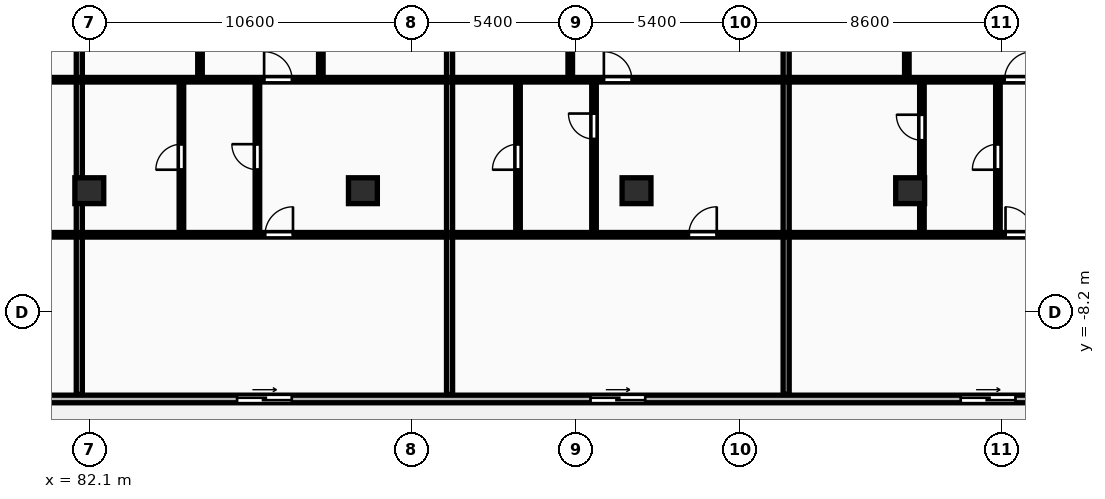
"""IFC4 building model, lengths in metres.
Left out: names, types, materials, properties, quantities, classifications, styles, units other than length and angle.
Written with IfcOpenShell. Run it as: python <this file> out.ifc"""

import sys

from ifc_helpers import new_model, si_unit, direction, frame, frame_2d, origin, origin_2d, place, context, subcontext, project, spatial, rectangle, extrude, element, fill, save


model = new_model("IFC4")
c1 = context("Model", 3, precision=1e-05, world=origin(), true_north=direction((0.0, 1.0)))
c2 = subcontext(c1, "Body", "Model", "MODEL_VIEW")
j1 = project(units=[si_unit("LENGTHUNIT", "METRE"), si_unit("PLANEANGLEUNIT", "RADIAN")], contexts=[c1])
p1 = place(None, origin())
s1 = spatial("IfcSite", under=j1, at=p1, CompositionType="ELEMENT")
p2 = place(p1, origin())
s2 = spatial("IfcBuilding", under=s1, at=p2, CompositionType="ELEMENT")
p3 = place(p2, frame((0.0, 0.0, 24.0)))
s3 = spatial("IfcBuildingStorey", under=s2, at=p3, CompositionType="ELEMENT", Elevation=24.0)
for number, where, z_axis, x_axis in (
    (1, (82.1, -4.2, 0.0), (0.0, 0.0, 1.0), (1.0, 0.0, 0.0)),
    (2, (91.1, -4.2, 0.0), (0.0, 0.0, 1.0), (1.0, 0.0, 0.0)),
    (3, (100.1, -4.2, 0.0), (0.0, 0.0, 1.0), (1.0, 0.0, 0.0)),
    (4, (109.1, -4.2, 0.0), (0.0, 0.0, 1.0), (1.0, 0.0, 0.0)),
):
    element("IfcColumn", number, at=place(p3, frame(where, z_axis=z_axis, x_axis=x_axis)), inside=s3, PredefinedType="COLUMN", context=c2, shape_type="SweptSolid", body=[
        extrude(rectangle(XDim=0.95, YDim=0.85, at=origin_2d()), origin(), (0.0, 0.0, 1.0), 3.25),
    ])
p4 = place(p3, frame((70.7, -11.05, 0.0), z_axis=(0.0, 0.0, 1.0), x_axis=(1.0, 0.0, 0.0)))
e5 = element("IfcWall", 5, at=p4, inside=s3, PredefinedType="STANDARD", context=c2, shape_type="SweptSolid", body=[
    extrude(rectangle(XDim=62.0, YDim=0.25, at=frame_2d((31.0, 0.0))), origin(), (0.0, 0.0, 1.0), 2.97),
])
p5 = place(p4, frame((4.636, 0.0, 0.0)))
e6 = element("IfcOpeningElement", 6, at=p5, cuts=e5, PredefinedType="OPENING", context=c2, shape_type="SweptSolid", body=[
    extrude(rectangle(XDim=1.8, YDim=2.2, at=frame_2d((0.9, 1.1))), frame((0.0, 0.135, 0.0), z_axis=(0.0, -1.0, 0.0), x_axis=(1.0, 0.0, 0.0)), (0.0, 0.0, 1.0), 0.27),
])
p6 = place(p4, frame((16.261, 0.0, 0.0)))
e7 = element("IfcOpeningElement", 7, at=p6, cuts=e5, PredefinedType="OPENING", context=c2, shape_type="SweptSolid", body=[
    extrude(rectangle(XDim=1.8, YDim=2.2, at=frame_2d((0.9, 1.1))), frame((0.0, 0.135, 0.0), z_axis=(0.0, -1.0, 0.0), x_axis=(1.0, 0.0, 0.0)), (0.0, 0.0, 1.0), 0.27),
])
p7 = place(p4, frame((27.886, 0.0, 0.0)))
e8 = element("IfcOpeningElement", 8, at=p7, cuts=e5, PredefinedType="OPENING", context=c2, shape_type="SweptSolid", body=[
    extrude(rectangle(XDim=1.8, YDim=2.2, at=frame_2d((0.9, 1.1))), frame((0.0, 0.135, 0.0), z_axis=(0.0, -1.0, 0.0), x_axis=(1.0, 0.0, 0.0)), (0.0, 0.0, 1.0), 0.27),
])
p8 = place(p4, frame((40.064, 0.0, 0.0)))
e9 = element("IfcOpeningElement", 9, at=p8, cuts=e5, PredefinedType="OPENING", context=c2, shape_type="SweptSolid", body=[
    extrude(rectangle(XDim=1.8, YDim=2.2, at=frame_2d((0.9, 1.1))), frame((0.0, 0.135, 0.0), z_axis=(0.0, -1.0, 0.0), x_axis=(1.0, 0.0, 0.0)), (0.0, 0.0, 1.0), 0.27),
])
p9 = place(p4, frame((51.124, 0.0, 0.0)))
e10 = element("IfcOpeningElement", 10, at=p9, cuts=e5, PredefinedType="OPENING", context=c2, shape_type="SweptSolid", body=[
    extrude(rectangle(XDim=1.8, YDim=2.2, at=frame_2d((0.9, 1.1))), frame((0.0, 0.135, 0.0), z_axis=(0.0, -1.0, 0.0), x_axis=(1.0, 0.0, 0.0)), (0.0, 0.0, 1.0), 0.27),
])
p10 = place(p4, frame((57.9, 0.0, 0.85)))
e11 = element("IfcOpeningElement", 11, at=p10, cuts=e5, PredefinedType="OPENING", context=c2, shape_type="SweptSolid", body=[
    extrude(rectangle(XDim=2.4, YDim=1.9, at=frame_2d((1.2, 0.95))), frame((0.0, 0.135, 0.0), z_axis=(0.0, -1.0, 0.0), x_axis=(1.0, 0.0, 0.0)), (0.0, 0.0, 1.0), 0.27),
])
p11 = place(p3, frame((81.771, -10.9, 0.0), z_axis=(0.0, 0.0, 1.0), x_axis=(0.0, 1.0, 0.0)))
e12 = element("IfcWall", 12, at=p11, inside=s3, PredefinedType="PARTITIONING", context=c2, shape_type="SweptSolid", body=[
    extrude(rectangle(XDim=27.07, YDim=0.2, at=frame_2d((13.535, 0.0))), origin(), (0.0, 0.0, 1.0), 2.22),
])
p12 = place(p3, frame((70.78, -0.55, 0.0), z_axis=(0.0, 0.0, 1.0), x_axis=(1.0, 0.0, 0.0)))
e13 = element("IfcWall", 13, at=p12, inside=s3, PredefinedType="PARTITIONING", context=c2, shape_type="SweptSolid", body=[
    extrude(rectangle(XDim=10.911, YDim=0.15, at=frame_2d((5.456, 0.0))), origin(), (0.0, 0.0, 1.0), 2.97),
])
p13 = place(p12, frame((4.996, 0.0, 0.0)))
e14 = element("IfcOpeningElement", 14, at=p13, cuts=e13, PredefinedType="OPENING", context=c2, shape_type="SweptSolid", body=[
    extrude(rectangle(XDim=0.92, YDim=2.08, at=frame_2d((0.46, 1.04))), frame((0.0, 0.085, 0.0), z_axis=(0.0, -1.0, 0.0), x_axis=(1.0, 0.0, 0.0)), (0.0, 0.0, 1.0), 0.17),
])
p14 = place(p3, frame((70.78, -5.65, 0.0), z_axis=(0.0, 0.0, 1.0), x_axis=(1.0, 0.0, 0.0)))
e15 = element("IfcWall", 15, at=p14, inside=s3, PredefinedType="PARTITIONING", context=c2, shape_type="SweptSolid", body=[
    extrude(rectangle(XDim=10.911, YDim=0.15, at=frame_2d((5.456, 0.0))), origin(), (0.0, 0.0, 1.0), 2.97),
])
p15 = place(p14, frame((5.399, 0.0, 0.0)))
e16 = element("IfcOpeningElement", 16, at=p15, cuts=e15, PredefinedType="OPENING", context=c2, shape_type="SweptSolid", body=[
    extrude(rectangle(XDim=0.92, YDim=2.08, at=frame_2d((0.46, 1.04))), frame((0.0, 0.085, 0.0), z_axis=(0.0, -1.0, 0.0), x_axis=(1.0, 0.0, 0.0)), (0.0, 0.0, 1.0), 0.17),
])
p16 = place(p3, frame((93.95, -10.9, 0.0), z_axis=(0.0, 0.0, 1.0), x_axis=(0.0, 1.0, 0.0)))
e17 = element("IfcWall", 17, at=p16, inside=s3, PredefinedType="PARTITIONING", context=c2, shape_type="SweptSolid", body=[
    extrude(rectangle(XDim=27.07, YDim=0.2, at=frame_2d((13.535, 0.0))), origin(), (0.0, 0.0, 1.0), 2.97),
])
p17 = place(p3, frame((89.716, -0.51, 0.0), z_axis=(0.0, 0.0, 1.0), x_axis=(0.0, 1.0, 0.0)))
e18 = element("IfcWall", 18, at=p17, inside=s3, PredefinedType="PARTITIONING", context=c2, shape_type="SweptSolid", body=[
    extrude(rectangle(XDim=8.53, YDim=0.15, at=frame_2d((4.265, 0.0))), origin(), (0.0, 0.0, 1.0), 2.97),
])
p18 = place(p17, frame((3.845, 0.0, 0.0)))
e19 = element("IfcOpeningElement", 19, at=p18, cuts=e18, PredefinedType="OPENING", context=c2, shape_type="SweptSolid", body=[
    extrude(rectangle(XDim=0.84, YDim=2.04, at=frame_2d((0.42, 1.02))), frame((0.0, 0.085, 0.0), z_axis=(0.0, -1.0, 0.0), x_axis=(1.0, 0.0, 0.0)), (0.0, 0.0, 1.0), 0.17),
])
p19 = place(p3, frame((85.741, -0.51, 0.0), z_axis=(0.0, 0.0, 1.0), x_axis=(0.0, 1.0, 0.0)))
e20 = element("IfcWall", 20, at=p19, inside=s3, PredefinedType="PARTITIONING", context=c2, shape_type="SweptSolid", body=[
    extrude(rectangle(XDim=16.7, YDim=0.15, at=frame_2d((8.35, 0.0))), origin(), (0.0, 0.0, 1.0), 2.97),
])
p20 = place(p19, frame((7.4, 0.0, 0.0)))
e21 = element("IfcOpeningElement", 21, at=p20, cuts=e20, PredefinedType="OPENING", context=c2, shape_type="SweptSolid", body=[
    extrude(rectangle(XDim=0.88, YDim=2.06, at=frame_2d((0.44, 1.03))), frame((0.0, 0.085, 0.0), z_axis=(0.0, -1.0, 0.0), x_axis=(1.0, 0.0, 0.0)), (0.0, 0.0, 1.0), 0.17),
])
p21 = place(p3, frame((85.13, -5.59, 0.0), z_axis=(0.0, 0.0, 1.0), x_axis=(0.0, 1.0, 0.0)))
e22 = element("IfcWall", 22, at=p21, inside=s3, PredefinedType="PARTITIONING", context=c2, shape_type="SweptSolid", body=[
    extrude(rectangle(XDim=5.0, YDim=0.15, at=frame_2d((2.5, 0.0))), origin(), (0.0, 0.0, 1.0), 2.97),
])
p22 = place(p21, frame((2.08, 0.0, 0.0)))
e23 = element("IfcOpeningElement", 23, at=p22, cuts=e22, PredefinedType="OPENING", context=c2, shape_type="SweptSolid", body=[
    extrude(rectangle(XDim=0.84, YDim=2.04, at=frame_2d((0.42, 1.02))), frame((0.0, 0.085, 0.0), z_axis=(0.0, -1.0, 0.0), x_axis=(1.0, 0.0, 0.0)), (0.0, 0.0, 1.0), 0.17),
])
p23 = place(p3, frame((87.63, -5.59, 0.0), z_axis=(0.0, 0.0, 1.0), x_axis=(0.0, 1.0, 0.0)))
e24 = element("IfcWall", 24, at=p23, inside=s3, PredefinedType="PARTITIONING", context=c2, shape_type="SweptSolid", body=[
    extrude(rectangle(XDim=5.0, YDim=0.15, at=frame_2d((2.5, 0.0))), origin(), (0.0, 0.0, 1.0), 2.97),
])
p24 = place(p23, frame((2.08, 0.0, 0.0)))
e25 = element("IfcOpeningElement", 25, at=p24, cuts=e24, PredefinedType="OPENING", context=c2, shape_type="SweptSolid", body=[
    extrude(rectangle(XDim=0.84, YDim=2.04, at=frame_2d((0.42, 1.02))), frame((0.0, 0.085, 0.0), z_axis=(0.0, -1.0, 0.0), x_axis=(1.0, 0.0, 0.0)), (0.0, 0.0, 1.0), 0.17),
])
p25 = place(p3, frame((81.851, -0.55, 0.0), z_axis=(0.0, 0.0, 1.0), x_axis=(1.0, 0.0, 0.0)))
e26 = element("IfcWall", 26, at=p25, inside=s3, PredefinedType="PARTITIONING", context=c2, shape_type="SweptSolid", body=[
    extrude(rectangle(XDim=12.019, YDim=0.15, at=frame_2d((6.009, 0.0))), origin(), (0.0, 0.0, 1.0), 2.97),
])
p26 = place(p25, frame((5.999, 0.0, 0.0)))
e27 = element("IfcOpeningElement", 27, at=p26, cuts=e26, PredefinedType="OPENING", context=c2, shape_type="SweptSolid", body=[
    extrude(rectangle(XDim=0.92, YDim=2.08, at=frame_2d((0.46, 1.04))), frame((0.0, 0.085, 0.0), z_axis=(0.0, -1.0, 0.0), x_axis=(1.0, 0.0, 0.0)), (0.0, 0.0, 1.0), 0.17),
])
p27 = place(p3, frame((81.851, -5.65, 0.0), z_axis=(0.0, 0.0, 1.0), x_axis=(1.0, 0.0, 0.0)))
e28 = element("IfcWall", 28, at=p27, inside=s3, PredefinedType="PARTITIONING", context=c2, shape_type="SweptSolid", body=[
    extrude(rectangle(XDim=12.019, YDim=0.15, at=frame_2d((6.009, 0.0))), origin(), (0.0, 0.0, 1.0), 2.97),
])
p28 = place(p27, frame((6.029, 0.0, 0.0)))
e29 = element("IfcOpeningElement", 29, at=p28, cuts=e28, PredefinedType="OPENING", context=c2, shape_type="SweptSolid", body=[
    extrude(rectangle(XDim=0.92, YDim=2.08, at=frame_2d((0.46, 1.04))), frame((0.0, 0.085, 0.0), z_axis=(0.0, -1.0, 0.0), x_axis=(1.0, 0.0, 0.0)), (0.0, 0.0, 1.0), 0.17),
])
p29 = place(p3, frame((105.021, -10.9, 0.0), z_axis=(0.0, 0.0, 1.0), x_axis=(0.0, 1.0, 0.0)))
e30 = element("IfcWall", 30, at=p29, inside=s3, PredefinedType="PARTITIONING", context=c2, shape_type="SweptSolid", body=[
    extrude(rectangle(XDim=27.07, YDim=0.2, at=frame_2d((13.535, 0.0))), origin(), (0.0, 0.0, 1.0), 2.97),
])
p30 = place(p3, frame((97.92, -0.51, 0.0), z_axis=(0.0, 0.0, 1.0), x_axis=(0.0, 1.0, 0.0)))
e31 = element("IfcWall", 31, at=p30, inside=s3, PredefinedType="PARTITIONING", context=c2, shape_type="SweptSolid", body=[
    extrude(rectangle(XDim=16.7, YDim=0.15, at=frame_2d((8.35, 0.0))), origin(), (0.0, 0.0, 1.0), 2.97),
])
p31 = place(p30, frame((4.765, 0.0, 0.0)))
e32 = element("IfcOpeningElement", 32, at=p31, cuts=e31, PredefinedType="OPENING", context=c2, shape_type="SweptSolid", body=[
    extrude(rectangle(XDim=0.88, YDim=2.06, at=frame_2d((0.44, 1.03))), frame((0.0, 0.085, 0.0), z_axis=(0.0, -1.0, 0.0), x_axis=(1.0, 0.0, 0.0)), (0.0, 0.0, 1.0), 0.17),
])
p32 = place(p3, frame((96.201, -5.59, 0.0), z_axis=(0.0, 0.0, 1.0), x_axis=(0.0, 1.0, 0.0)))
e33 = element("IfcWall", 33, at=p32, inside=s3, PredefinedType="PARTITIONING", context=c2, shape_type="SweptSolid", body=[
    extrude(rectangle(XDim=5.0, YDim=0.15, at=frame_2d((2.5, 0.0))), origin(), (0.0, 0.0, 1.0), 2.97),
])
p33 = place(p32, frame((2.08, 0.0, 0.0)))
e34 = element("IfcOpeningElement", 34, at=p33, cuts=e33, PredefinedType="OPENING", context=c2, shape_type="SweptSolid", body=[
    extrude(rectangle(XDim=0.84, YDim=2.04, at=frame_2d((0.42, 1.02))), frame((0.0, 0.085, 0.0), z_axis=(0.0, -1.0, 0.0), x_axis=(1.0, 0.0, 0.0)), (0.0, 0.0, 1.0), 0.17),
])
p34 = place(p3, frame((98.701, -5.59, 0.0), z_axis=(0.0, 0.0, 1.0), x_axis=(0.0, 1.0, 0.0)))
e35 = element("IfcWall", 35, at=p34, inside=s3, PredefinedType="PARTITIONING", context=c2, shape_type="SweptSolid", body=[
    extrude(rectangle(XDim=5.0, YDim=0.15, at=frame_2d((2.5, 0.0))), origin(), (0.0, 0.0, 1.0), 2.97),
])
p35 = place(p34, frame((3.088, 0.0, 0.0)))
e36 = element("IfcOpeningElement", 36, at=p35, cuts=e35, PredefinedType="OPENING", context=c2, shape_type="SweptSolid", body=[
    extrude(rectangle(XDim=0.84, YDim=2.04, at=frame_2d((0.42, 1.02))), frame((0.0, 0.085, 0.0), z_axis=(0.0, -1.0, 0.0), x_axis=(1.0, 0.0, 0.0)), (0.0, 0.0, 1.0), 0.17),
])
p36 = place(p3, frame((94.03, -0.55, 0.0), z_axis=(0.0, 0.0, 1.0), x_axis=(1.0, 0.0, 0.0)))
e37 = element("IfcWall", 37, at=p36, inside=s3, PredefinedType="PARTITIONING", context=c2, shape_type="SweptSolid", body=[
    extrude(rectangle(XDim=10.911, YDim=0.15, at=frame_2d((5.456, 0.0))), origin(), (0.0, 0.0, 1.0), 2.97),
])
p37 = place(p36, frame((4.996, 0.0, 0.0)))
e38 = element("IfcOpeningElement", 38, at=p37, cuts=e37, PredefinedType="OPENING", context=c2, shape_type="SweptSolid", body=[
    extrude(rectangle(XDim=0.92, YDim=2.08, at=frame_2d((0.46, 1.04))), frame((0.0, 0.085, 0.0), z_axis=(0.0, -1.0, 0.0), x_axis=(1.0, 0.0, 0.0)), (0.0, 0.0, 1.0), 0.17),
])
p38 = place(p3, frame((94.03, -5.65, 0.0), z_axis=(0.0, 0.0, 1.0), x_axis=(1.0, 0.0, 0.0)))
e39 = element("IfcWall", 39, at=p38, inside=s3, PredefinedType="PARTITIONING", context=c2, shape_type="SweptSolid", body=[
    extrude(rectangle(XDim=10.911, YDim=0.15, at=frame_2d((5.456, 0.0))), origin(), (0.0, 0.0, 1.0), 2.97),
])
p39 = place(p38, frame((7.789, 0.0, 0.0)))
e40 = element("IfcOpeningElement", 40, at=p39, cuts=e39, PredefinedType="OPENING", context=c2, shape_type="SweptSolid", body=[
    extrude(rectangle(XDim=0.92, YDim=2.08, at=frame_2d((0.46, 1.04))), frame((0.0, 0.085, 0.0), z_axis=(0.0, -1.0, 0.0), x_axis=(1.0, 0.0, 0.0)), (0.0, 0.0, 1.0), 0.17),
])
p40 = place(p3, frame((108.991, -0.51, 0.0), z_axis=(0.0, 0.0, 1.0), x_axis=(0.0, 1.0, 0.0)))
e41 = element("IfcWall", 41, at=p40, inside=s3, PredefinedType="PARTITIONING", context=c2, shape_type="SweptSolid", body=[
    extrude(rectangle(XDim=16.7, YDim=0.15, at=frame_2d((8.35, 0.0))), origin(), (0.0, 0.0, 1.0), 2.22),
])
p41 = place(p40, frame((4.747, 0.0, 0.0)))
e42 = element("IfcOpeningElement", 42, at=p41, cuts=e41, PredefinedType="OPENING", context=c2, shape_type="SweptSolid", body=[
    extrude(rectangle(XDim=0.88, YDim=2.06, at=frame_2d((0.44, 1.03))), frame((0.0, 0.085, 0.0), z_axis=(0.0, -1.0, 0.0), x_axis=(1.0, 0.0, 0.0)), (0.0, 0.0, 1.0), 0.17),
])
p42 = place(p3, frame((109.487, -5.59, 0.0), z_axis=(0.0, 0.0, 1.0), x_axis=(0.0, 1.0, 0.0)))
e43 = element("IfcWall", 43, at=p42, inside=s3, PredefinedType="PARTITIONING", context=c2, shape_type="SweptSolid", body=[
    extrude(rectangle(XDim=5.0, YDim=0.15, at=frame_2d((2.5, 0.0))), origin(), (0.0, 0.0, 1.0), 2.22),
])
p43 = place(p42, frame((3.049, 0.0, 0.0)))
e44 = element("IfcOpeningElement", 44, at=p43, cuts=e43, PredefinedType="OPENING", context=c2, shape_type="SweptSolid", body=[
    extrude(rectangle(XDim=0.84, YDim=2.04, at=frame_2d((0.42, 1.02))), frame((0.0, 0.085, 0.0), z_axis=(0.0, -1.0, 0.0), x_axis=(1.0, 0.0, 0.0)), (0.0, 0.0, 1.0), 0.17),
])
p44 = place(p3, frame((111.987, -5.59, 0.0), z_axis=(0.0, 0.0, 1.0), x_axis=(0.0, 1.0, 0.0)))
e45 = element("IfcWall", 45, at=p44, inside=s3, PredefinedType="PARTITIONING", context=c2, shape_type="SweptSolid", body=[
    extrude(rectangle(XDim=5.0, YDim=0.15, at=frame_2d((2.5, 0.0))), origin(), (0.0, 0.0, 1.0), 2.97),
])
p45 = place(p44, frame((2.08, 0.0, 0.0)))
e46 = element("IfcOpeningElement", 46, at=p45, cuts=e45, PredefinedType="OPENING", context=c2, shape_type="SweptSolid", body=[
    extrude(rectangle(XDim=0.84, YDim=2.04, at=frame_2d((0.42, 1.02))), frame((0.0, 0.085, 0.0), z_axis=(0.0, -1.0, 0.0), x_axis=(1.0, 0.0, 0.0)), (0.0, 0.0, 1.0), 0.17),
])
p46 = place(p3, frame((105.101, -0.55, 0.0), z_axis=(0.0, 0.0, 1.0), x_axis=(1.0, 0.0, 0.0)))
e47 = element("IfcWall", 47, at=p46, inside=s3, PredefinedType="PARTITIONING", context=c2, shape_type="SweptSolid", body=[
    extrude(rectangle(XDim=13.126, YDim=0.15, at=frame_2d((6.563, 0.0))), origin(), (0.0, 0.0, 1.0), 2.97),
])
p47 = place(p46, frame((7.106, 0.0, 0.0)))
e48 = element("IfcOpeningElement", 48, at=p47, cuts=e47, PredefinedType="OPENING", context=c2, shape_type="SweptSolid", body=[
    extrude(rectangle(XDim=0.92, YDim=2.08, at=frame_2d((0.46, 1.04))), frame((0.0, 0.085, 0.0), z_axis=(0.0, -1.0, 0.0), x_axis=(1.0, 0.0, 0.0)), (0.0, 0.0, 1.0), 0.17),
])
p48 = place(p3, frame((105.101, -5.65, 0.0), z_axis=(0.0, 0.0, 1.0), x_axis=(1.0, 0.0, 0.0)))
e49 = element("IfcWall", 49, at=p48, inside=s3, PredefinedType="PARTITIONING", context=c2, shape_type="SweptSolid", body=[
    extrude(rectangle(XDim=13.126, YDim=0.15, at=frame_2d((6.563, 0.0))), origin(), (0.0, 0.0, 1.0), 2.97),
])
p49 = place(p48, frame((7.136, 0.0, 0.0)))
e50 = element("IfcOpeningElement", 50, at=p49, cuts=e49, PredefinedType="OPENING", context=c2, shape_type="SweptSolid", body=[
    extrude(rectangle(XDim=0.92, YDim=2.08, at=frame_2d((0.46, 1.04))), frame((0.0, 0.085, 0.0), z_axis=(0.0, -1.0, 0.0), x_axis=(1.0, 0.0, 0.0)), (0.0, 0.0, 1.0), 0.17),
])
p50 = place(p6, origin())
e51 = element("IfcDoor", 51, at=p50, inside=s3, OperationType="SLIDING_TO_RIGHT", PredefinedType="DOOR", context=c2, shape_type="SweptSolid", body=[
    extrude(rectangle(XDim=1.8, YDim=2.2, at=frame_2d((0.9, 1.1))), frame((0.0, 0.025, 0.0), z_axis=(0.0, -1.0, 0.0), x_axis=(1.0, 0.0, 0.0)), (0.0, 0.0, 1.0), 0.05),
])
fill(e7, e51)
p51 = place(p7, origin())
e52 = element("IfcDoor", 52, at=p51, inside=s3, OperationType="SLIDING_TO_RIGHT", PredefinedType="DOOR", context=c2, shape_type="SweptSolid", body=[
    extrude(rectangle(XDim=1.8, YDim=2.2, at=frame_2d((0.9, 1.1))), frame((0.0, 0.025, 0.0), z_axis=(0.0, -1.0, 0.0), x_axis=(1.0, 0.0, 0.0)), (0.0, 0.0, 1.0), 0.05),
])
fill(e8, e52)
p52 = place(p8, origin())
e53 = element("IfcDoor", 53, at=p52, inside=s3, OperationType="SLIDING_TO_RIGHT", PredefinedType="DOOR", context=c2, shape_type="SweptSolid", body=[
    extrude(rectangle(XDim=1.8, YDim=2.2, at=frame_2d((0.9, 1.1))), frame((0.0, 0.025, 0.0), z_axis=(0.0, -1.0, 0.0), x_axis=(1.0, 0.0, 0.0)), (0.0, 0.0, 1.0), 0.05),
])
fill(e9, e53)
p53 = place(p22, origin())
e54 = element("IfcDoor", 54, at=p53, inside=s3, OperationType="SINGLE_SWING_LEFT", PredefinedType="DOOR", context=c2, shape_type="SweptSolid", body=[
    extrude(rectangle(XDim=0.84, YDim=2.04, at=frame_2d((0.42, 1.02))), frame((0.0, 0.025, 0.0), z_axis=(0.0, -1.0, 0.0), x_axis=(1.0, 0.0, 0.0)), (0.0, 0.0, 1.0), 0.05),
])
fill(e23, e54)
p54 = place(p24, origin())
e55 = element("IfcDoor", 55, at=p54, inside=s3, OperationType="SINGLE_SWING_RIGHT", PredefinedType="DOOR", context=c2, shape_type="SweptSolid", body=[
    extrude(rectangle(XDim=0.84, YDim=2.04, at=frame_2d((0.42, 1.02))), frame((0.0, 0.025, 0.0), z_axis=(0.0, -1.0, 0.0), x_axis=(1.0, 0.0, 0.0)), (0.0, 0.0, 1.0), 0.05),
])
fill(e25, e55)
p55 = place(p26, origin())
e56 = element("IfcDoor", 56, at=p55, inside=s3, OperationType="SINGLE_SWING_LEFT", PredefinedType="DOOR", context=c2, shape_type="SweptSolid", body=[
    extrude(rectangle(XDim=0.92, YDim=2.08, at=frame_2d((0.46, 1.04))), frame((0.0, 0.025, 0.0), z_axis=(0.0, -1.0, 0.0), x_axis=(1.0, 0.0, 0.0)), (0.0, 0.0, 1.0), 0.05),
])
fill(e27, e56)
p56 = place(p28, origin())
e57 = element("IfcDoor", 57, at=p56, inside=s3, OperationType="SINGLE_SWING_RIGHT", PredefinedType="DOOR", context=c2, shape_type="SweptSolid", body=[
    extrude(rectangle(XDim=0.92, YDim=2.08, at=frame_2d((0.46, 1.04))), frame((0.0, 0.025, 0.0), z_axis=(0.0, -1.0, 0.0), x_axis=(1.0, 0.0, 0.0)), (0.0, 0.0, 1.0), 0.05),
])
fill(e29, e57)
p57 = place(p33, origin())
e58 = element("IfcDoor", 58, at=p57, inside=s3, OperationType="SINGLE_SWING_LEFT", PredefinedType="DOOR", context=c2, shape_type="SweptSolid", body=[
    extrude(rectangle(XDim=0.84, YDim=2.04, at=frame_2d((0.42, 1.02))), frame((0.0, 0.025, 0.0), z_axis=(0.0, -1.0, 0.0), x_axis=(1.0, 0.0, 0.0)), (0.0, 0.0, 1.0), 0.05),
])
fill(e34, e58)
p58 = place(p35, origin())
e59 = element("IfcDoor", 59, at=p58, inside=s3, OperationType="SINGLE_SWING_RIGHT", PredefinedType="DOOR", context=c2, shape_type="SweptSolid", body=[
    extrude(rectangle(XDim=0.84, YDim=2.04, at=frame_2d((0.42, 1.02))), frame((0.0, 0.025, 0.0), z_axis=(0.0, -1.0, 0.0), x_axis=(1.0, 0.0, 0.0)), (0.0, 0.0, 1.0), 0.05),
])
fill(e36, e59)
p59 = place(p37, origin())
e60 = element("IfcDoor", 60, at=p59, inside=s3, OperationType="SINGLE_SWING_LEFT", PredefinedType="DOOR", context=c2, shape_type="SweptSolid", body=[
    extrude(rectangle(XDim=0.92, YDim=2.08, at=frame_2d((0.46, 1.04))), frame((0.0, 0.025, 0.0), z_axis=(0.0, -1.0, 0.0), x_axis=(1.0, 0.0, 0.0)), (0.0, 0.0, 1.0), 0.05),
])
fill(e38, e60)
p60 = place(p39, origin())
e61 = element("IfcDoor", 61, at=p60, inside=s3, OperationType="SINGLE_SWING_RIGHT", PredefinedType="DOOR", context=c2, shape_type="SweptSolid", body=[
    extrude(rectangle(XDim=0.92, YDim=2.08, at=frame_2d((0.46, 1.04))), frame((0.0, 0.025, 0.0), z_axis=(0.0, -1.0, 0.0), x_axis=(1.0, 0.0, 0.0)), (0.0, 0.0, 1.0), 0.05),
])
fill(e40, e61)
p61 = place(p43, origin())
e62 = element("IfcDoor", 62, at=p61, inside=s3, OperationType="SINGLE_SWING_RIGHT", PredefinedType="DOOR", context=c2, shape_type="SweptSolid", body=[
    extrude(rectangle(XDim=0.84, YDim=2.04, at=frame_2d((0.42, 1.02))), frame((0.0, 0.025, 0.0), z_axis=(0.0, -1.0, 0.0), x_axis=(1.0, 0.0, 0.0)), (0.0, 0.0, 1.0), 0.05),
])
fill(e44, e62)
p62 = place(p45, origin())
e63 = element("IfcDoor", 63, at=p62, inside=s3, OperationType="SINGLE_SWING_LEFT", PredefinedType="DOOR", context=c2, shape_type="SweptSolid", body=[
    extrude(rectangle(XDim=0.84, YDim=2.04, at=frame_2d((0.42, 1.02))), frame((0.0, 0.025, 0.0), z_axis=(0.0, -1.0, 0.0), x_axis=(1.0, 0.0, 0.0)), (0.0, 0.0, 1.0), 0.05),
])
fill(e46, e63)
p63 = place(p47, origin())
e64 = element("IfcDoor", 64, at=p63, inside=s3, OperationType="SINGLE_SWING_RIGHT", PredefinedType="DOOR", context=c2, shape_type="SweptSolid", body=[
    extrude(rectangle(XDim=0.92, YDim=2.08, at=frame_2d((0.46, 1.04))), frame((0.0, 0.025, 0.0), z_axis=(0.0, -1.0, 0.0), x_axis=(1.0, 0.0, 0.0)), (0.0, 0.0, 1.0), 0.05),
])
fill(e48, e64)
p64 = place(p49, origin())
e65 = element("IfcDoor", 65, at=p64, inside=s3, OperationType="SINGLE_SWING_LEFT", PredefinedType="DOOR", context=c2, shape_type="SweptSolid", body=[
    extrude(rectangle(XDim=0.92, YDim=2.08, at=frame_2d((0.46, 1.04))), frame((0.0, 0.025, 0.0), z_axis=(0.0, -1.0, 0.0), x_axis=(1.0, 0.0, 0.0)), (0.0, 0.0, 1.0), 0.05),
])
fill(e50, e65)
save(model, sys.argv[1])
